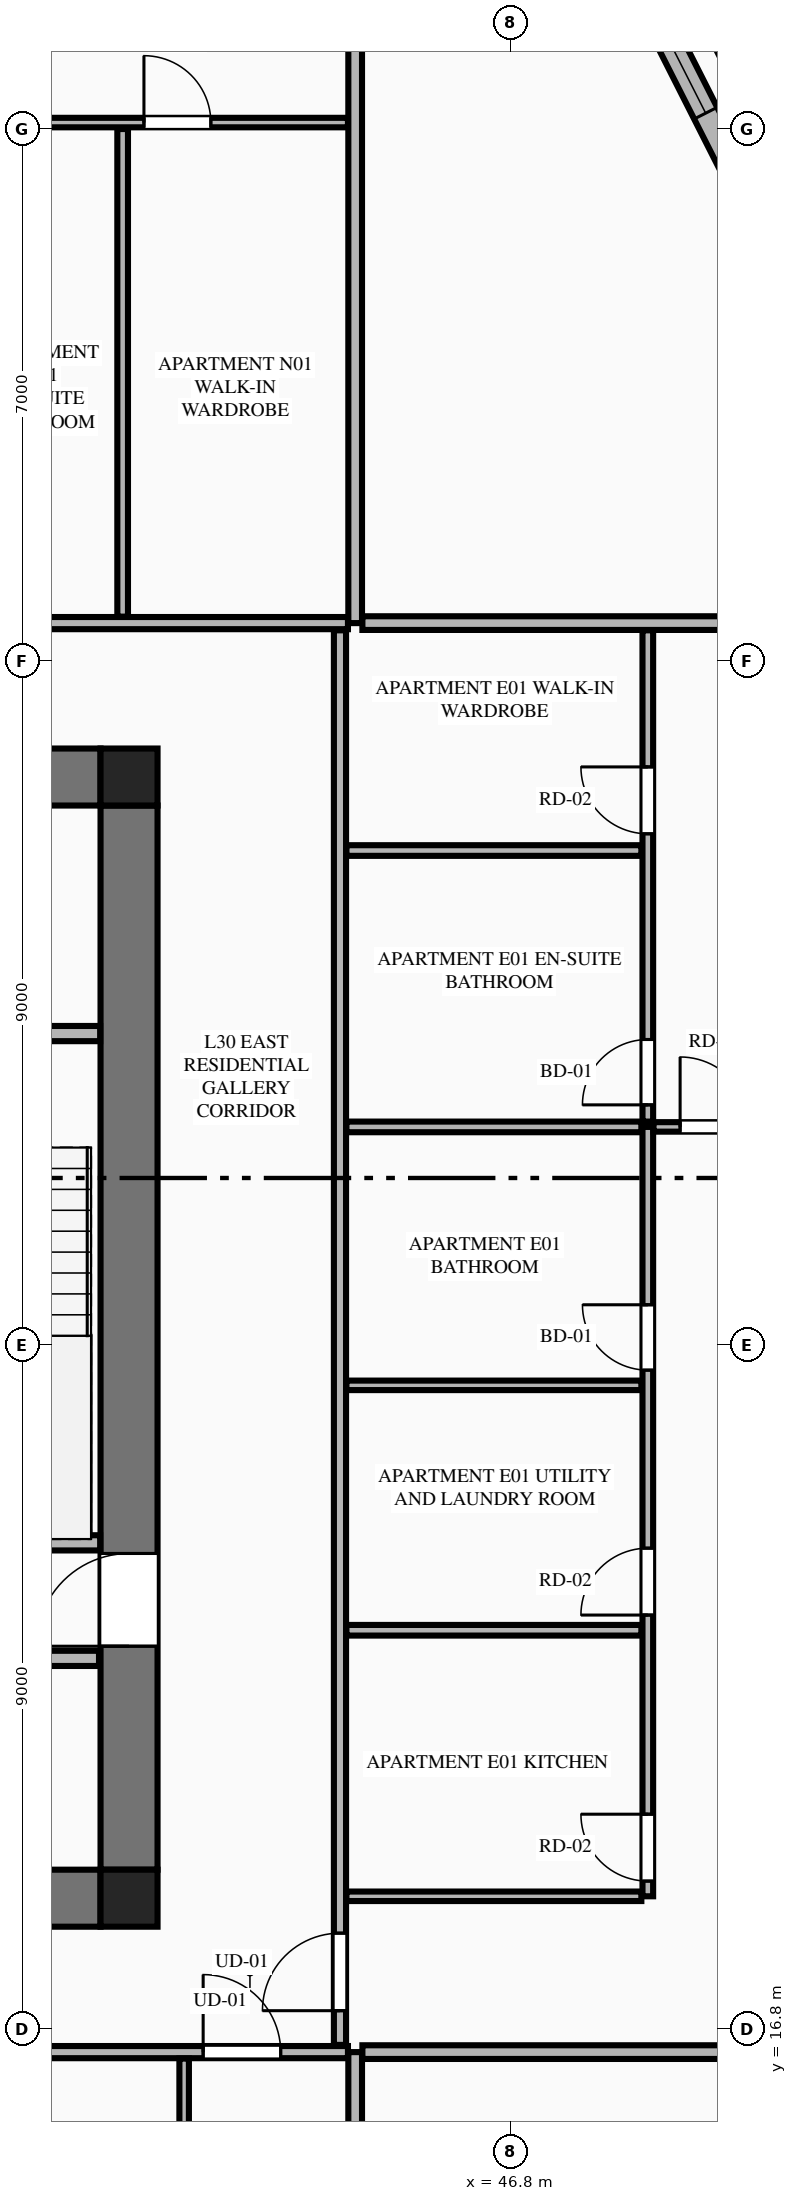
"""IFC4 building model, lengths in metres.
Left out: names, types, materials, properties, quantities, classifications, styles, units other than length and angle.
Written with IfcOpenShell. Run it as: python <this file> out.ifc"""

import sys

from ifc_helpers import new_model, si_unit, direction, frame, frame_2d, origin, origin_2d, place, context, subcontext, project, spatial, rectangle, extrude, element, fill, save


model = new_model("IFC4")
c1 = context("Model", 3, precision=1e-05, world=origin(), true_north=direction((0.0, 1.0)))
c2 = subcontext(c1, "Body", "Model", "MODEL_VIEW")
j1 = project(units=[si_unit("LENGTHUNIT", "METRE"), si_unit("PLANEANGLEUNIT", "RADIAN")], contexts=[c1])
p1 = place(None, origin())
s1 = spatial("IfcSite", under=j1, at=p1, CompositionType="ELEMENT")
p2 = place(p1, origin())
s2 = spatial("IfcBuilding", under=s1, at=p2, CompositionType="ELEMENT")
p3 = place(p2, frame((0.0, 0.0, 116.15)))
s3 = spatial("IfcBuildingStorey", under=s2, at=p3, CompositionType="ELEMENT", Elevation=116.15)
for number, where, z_axis, x_axis in (
    (1, (41.775, 18.525, 0.0), (0.0, 0.0, 1.0), (1.0, 0.0, 0.0)),
    (2, (41.775, 33.275, 0.0), (0.0, 0.0, 1.0), (1.0, 0.0, 0.0)),
):
    element("IfcColumn", number, at=place(p3, frame(where, z_axis=z_axis, x_axis=x_axis)), inside=s3, PredefinedType="COLUMN", context=c2, shape_type="SweptSolid", body=[
        extrude(rectangle(XDim=0.75, YDim=0.75, at=origin_2d()), origin(), (0.0, 0.0, 1.0), 3.55),
    ])
for number, where, z_axis, x_axis in (
    (3, (23.4, 18.525, 0.0), (0.0, 0.0, 1.0), (1.0, 0.0, 0.0)),
    (4, (23.4, 33.275, 0.0), (0.0, 0.0, 1.0), (1.0, 0.0, 0.0)),
):
    element("IfcWall", number, at=place(p3, frame(where, z_axis=z_axis, x_axis=x_axis)), inside=s3, PredefinedType="SHEAR", context=c2, shape_type="SweptSolid", body=[
        extrude(rectangle(XDim=18.0, YDim=0.75, at=frame_2d((9.0, 0.0))), origin(), (0.0, 0.0, 1.0), 3.34),
    ])
p4 = place(p3, frame((41.775, 18.9, 0.0), z_axis=(0.0, 0.0, 1.0), x_axis=(0.0, 1.0, 0.0)))
e5 = element("IfcWall", 5, at=p4, inside=s3, PredefinedType="SHEAR", context=c2, shape_type="SweptSolid", body=[
    extrude(rectangle(XDim=14.0, YDim=0.75, at=frame_2d((7.0, 0.0))), origin(), (0.0, 0.0, 1.0), 3.34),
])
p5 = place(p4, frame((2.94, 0.0, 0.0)))
e6 = element("IfcOpeningElement", 6, at=p5, cuts=e5, PredefinedType="OPENING", context=c2, shape_type="SweptSolid", body=[
    extrude(rectangle(XDim=1.22, YDim=2.25, at=frame_2d((0.61, 1.125))), frame((0.0, 0.385, 0.0), z_axis=(0.0, -1.0, 0.0), x_axis=(1.0, 0.0, 0.0)), (0.0, 0.0, 1.0), 0.77),
])
p6 = place(p3, frame((38.125, 23.2, 0.0), z_axis=(0.0, 0.0, 1.0), x_axis=(1.0, 0.0, 0.0)))
e7 = element("IfcWall", 7, at=p6, inside=s3, PredefinedType="PLUMBINGWALL", context=c2, shape_type="SweptSolid", body=[
    extrude(rectangle(XDim=3.27, YDim=0.2, at=frame_2d((1.635, 0.0))), origin(), (0.0, 0.0, 1.0), 3.34),
])
p7 = place(p3, frame((38.125, 29.9, 0.0), z_axis=(0.0, 0.0, 1.0), x_axis=(1.0, 0.0, 0.0)))
e8 = element("IfcWall", 8, at=p7, inside=s3, PredefinedType="PLUMBINGWALL", context=c2, shape_type="SweptSolid", body=[
    extrude(rectangle(XDim=3.27, YDim=0.2, at=frame_2d((1.635, 0.0))), origin(), (0.0, 0.0, 1.0), 3.34),
])
p8 = place(p7, frame((0.5, 0.0, 0.0)))
e9 = element("IfcOpeningElement", 9, at=p8, cuts=e8, PredefinedType="OPENING", context=c2, shape_type="SweptSolid", body=[
    extrude(rectangle(XDim=0.85, YDim=2.05, at=frame_2d((0.425, 1.025))), frame((0.0, 0.11, 0.0), z_axis=(0.0, -1.0, 0.0), x_axis=(1.0, 0.0, 0.0)), (0.0, 0.0, 1.0), 0.22),
])
p9 = place(p3, frame((23.42, 21.68, 0.0), z_axis=(0.0, 0.0, 1.0), x_axis=(1.0, 0.0, 0.0)))
e10 = element("IfcWall", 10, at=p9, inside=s3, PredefinedType="PLUMBINGWALL", context=c2, shape_type="SweptSolid", body=[
    extrude(rectangle(XDim=17.96, YDim=0.2, at=frame_2d((8.98, 0.0))), origin(), (0.0, 0.0, 1.0), 3.34),
])
p10 = place(p9, frame((11.6, 0.0, 0.0)))
e11 = element("IfcOpeningElement", 11, at=p10, cuts=e10, PredefinedType="OPENING", context=c2, shape_type="SweptSolid", body=[
    extrude(rectangle(XDim=1.1, YDim=2.2, at=frame_2d((0.55, 1.1))), frame((0.0, 0.11, 0.0), z_axis=(0.0, -1.0, 0.0), x_axis=(1.0, 0.0, 0.0)), (0.0, 0.0, 1.0), 0.22),
])
p11 = place(p9, frame((0.41, 0.0, 0.0)))
e12 = element("IfcOpeningElement", 12, at=p11, cuts=e10, PredefinedType="OPENING", context=c2, shape_type="SweptSolid", body=[
    extrude(rectangle(XDim=0.85, YDim=2.05, at=frame_2d((0.425, 1.025))), frame((0.0, 0.11, 0.0), z_axis=(0.0, -1.0, 0.0), x_axis=(1.0, 0.0, 0.0)), (0.0, 0.0, 1.0), 0.22),
])
p12 = place(p9, frame((6.03, 0.0, 0.0)))
e13 = element("IfcOpeningElement", 13, at=p12, cuts=e10, PredefinedType="OPENING", context=c2, shape_type="SweptSolid", body=[
    extrude(rectangle(XDim=0.85, YDim=2.05, at=frame_2d((0.425, 1.025))), frame((0.0, 0.11, 0.0), z_axis=(0.0, -1.0, 0.0), x_axis=(1.0, 0.0, 0.0)), (0.0, 0.0, 1.0), 0.22),
])
p13 = place(p9, frame((13.78, 0.0, 0.0)))
e14 = element("IfcOpeningElement", 14, at=p13, cuts=e10, PredefinedType="OPENING", context=c2, shape_type="SweptSolid", body=[
    extrude(rectangle(XDim=0.85, YDim=2.05, at=frame_2d((0.425, 1.025))), frame((0.0, 0.11, 0.0), z_axis=(0.0, -1.0, 0.0), x_axis=(1.0, 0.0, 0.0)), (0.0, 0.0, 1.0), 0.22),
])
p14 = place(p3, frame((50.251, 40.251, 0.0), z_axis=(0.0, 0.0, 1.0), x_axis=(-0.451548465867, 0.892246593142, 0.0)))
e15 = element("IfcWall", 15, at=p14, inside=s3, PredefinedType="STANDARD", context=c2, shape_type="SweptSolid", body=[
    extrude(rectangle(XDim=5.04, YDim=0.34, at=frame_2d((2.52, 0.0))), origin(), (0.0, 0.0, 1.0), 2.797),
])
p15 = place(p14, frame((1.97, 0.0, 0.75)))
e16 = element("IfcOpeningElement", 16, at=p15, cuts=e15, PredefinedType="OPENING", context=c2, shape_type="SweptSolid", body=[
    extrude(rectangle(XDim=1.1, YDim=1.897, at=frame_2d((0.55, 0.948))), frame((0.0, 0.18, 0.0), z_axis=(0.0, -1.0, 0.0), x_axis=(1.0, 0.0, 0.0)), (0.0, 0.0, 1.0), 0.36),
])
p16 = place(p3, frame((44.75, 4.105, 0.0), z_axis=(0.0, 0.0, 1.0), x_axis=(0.0, 1.0, 0.0)))
e17 = element("IfcWall", 17, at=p16, inside=s3, PredefinedType="PARTITIONING", context=c2, shape_type="SweptSolid", body=[
    extrude(rectangle(XDim=12.395, YDim=0.18, at=frame_2d((6.198, 0.0))), origin(), (0.0, 0.0, 1.0), 3.34),
])
p17 = place(p3, frame((28.663, 16.5, 0.0), z_axis=(0.0, 0.0, 1.0), x_axis=(1.0, 0.0, 0.0)))
e18 = element("IfcWall", 18, at=p17, inside=s3, PredefinedType="PARTITIONING", context=c2, shape_type="SweptSolid", body=[
    extrude(rectangle(XDim=15.992, YDim=0.16, at=frame_2d((7.996, 0.0))), origin(), (0.0, 0.0, 1.0), 3.34),
])
p18 = place(p17, frame((14.087, 0.0, 0.0)))
e19 = element("IfcOpeningElement", 19, at=p18, cuts=e18, PredefinedType="OPENING", context=c2, shape_type="SweptSolid", body=[
    extrude(rectangle(XDim=1.02, YDim=2.25, at=frame_2d((0.51, 1.125))), frame((0.0, 0.09, 0.0), z_axis=(0.0, -1.0, 0.0), x_axis=(1.0, 0.0, 0.0)), (0.0, 0.0, 1.0), 0.18),
])
p19 = place(p3, frame((42.5, 12.391, 0.0), z_axis=(0.0, 0.0, 1.0), x_axis=(0.0, 1.0, 0.0)))
e20 = element("IfcWall", 20, at=p19, inside=s3, PredefinedType="PARTITIONING", context=c2, shape_type="SweptSolid", body=[
    extrude(rectangle(XDim=4.024, YDim=0.125, at=frame_2d((2.012, 0.0))), origin(), (0.0, 0.0, 1.0), 2.722),
])
p20 = place(p3, frame((44.75, 35.3, 0.0), z_axis=(0.0, 0.0, 1.0), x_axis=(0.0, 1.0, 0.0)))
e21 = element("IfcWall", 21, at=p20, inside=s3, PredefinedType="PARTITIONING", context=c2, shape_type="SweptSolid", body=[
    extrude(rectangle(XDim=12.195, YDim=0.18, at=frame_2d((6.098, 0.0))), origin(), (0.0, 0.0, 1.0), 3.34),
])
p21 = place(p3, frame((20.145, 35.3, 0.0), z_axis=(0.0, 0.0, 1.0), x_axis=(1.0, 0.0, 0.0)))
e22 = element("IfcWall", 22, at=p21, inside=s3, PredefinedType="PARTITIONING", context=c2, shape_type="SweptSolid", body=[
    extrude(rectangle(XDim=24.51, YDim=0.16, at=frame_2d((12.255, 0.0))), origin(), (0.0, 0.0, 1.0), 3.34),
])
p22 = place(p21, frame((0.405, 0.0, 0.0)))
e23 = element("IfcOpeningElement", 23, at=p22, cuts=e22, PredefinedType="OPENING", context=c2, shape_type="SweptSolid", body=[
    extrude(rectangle(XDim=1.35, YDim=2.35, at=frame_2d((0.675, 1.175))), frame((0.0, 0.09, 0.0), z_axis=(0.0, -1.0, 0.0), x_axis=(1.0, 0.0, 0.0)), (0.0, 0.0, 1.0), 0.18),
])
p23 = place(p3, frame((34.643, 41.885, 0.0), z_axis=(0.0, 0.0, 1.0), x_axis=(1.0, 0.0, 0.0)))
e24 = element("IfcWall", 24, at=p23, inside=s3, PredefinedType="PARTITIONING", context=c2, shape_type="SweptSolid", body=[
    extrude(rectangle(XDim=10.012, YDim=0.125, at=frame_2d((5.006, 0.0))), origin(), (0.0, 0.0, 1.0), 3.34),
])
p24 = place(p23, frame((5.18, 0.0, 0.0)))
e25 = element("IfcOpeningElement", 25, at=p24, cuts=e24, PredefinedType="OPENING", context=c2, shape_type="SweptSolid", body=[
    extrude(rectangle(XDim=0.86, YDim=2.1, at=frame_2d((0.43, 1.05))), frame((0.0, 0.073, 0.0), z_axis=(0.0, -1.0, 0.0), x_axis=(1.0, 0.0, 0.0)), (0.0, 0.0, 1.0), 0.145),
])
p25 = place(p23, frame((7.328, 0.0, 0.0)))
e26 = element("IfcOpeningElement", 26, at=p25, cuts=e24, PredefinedType="OPENING", context=c2, shape_type="SweptSolid", body=[
    extrude(rectangle(XDim=0.88, YDim=2.15, at=frame_2d((0.44, 1.075))), frame((0.0, 0.073, 0.0), z_axis=(0.0, -1.0, 0.0), x_axis=(1.0, 0.0, 0.0)), (0.0, 0.0, 1.0), 0.145),
])
p26 = place(p23, frame((0.3, 0.0, 0.0)))
e27 = element("IfcOpeningElement", 27, at=p26, cuts=e24, PredefinedType="OPENING", context=c2, shape_type="SweptSolid", body=[
    extrude(rectangle(XDim=0.88, YDim=2.15, at=frame_2d((0.44, 1.075))), frame((0.0, 0.073, 0.0), z_axis=(0.0, -1.0, 0.0), x_axis=(1.0, 0.0, 0.0)), (0.0, 0.0, 1.0), 0.145),
])
p27 = place(p3, frame((41.691, 35.385, 0.0), z_axis=(0.0, 0.0, 1.0), x_axis=(0.0, 1.0, 0.0)))
e28 = element("IfcWall", 28, at=p27, inside=s3, PredefinedType="PLUMBINGWALL", context=c2, shape_type="SweptSolid", body=[
    extrude(rectangle(XDim=6.415, YDim=0.14, at=frame_2d((3.208, 0.0))), origin(), (0.0, 0.0, 1.0), 2.722),
])
p28 = place(p3, frame((44.845, 16.5, 0.0), z_axis=(0.0, 0.0, 1.0), x_axis=(1.0, 0.0, 0.0)))
e29 = element("IfcWall", 29, at=p28, inside=s3, PredefinedType="PARTITIONING", context=c2, shape_type="SweptSolid", body=[
    extrude(rectangle(XDim=7.77, YDim=0.18, at=frame_2d((3.885, 0.0))), origin(), (0.0, 0.0, 1.0), 3.34),
])
p29 = place(p3, frame((44.845, 35.3, 0.0), z_axis=(0.0, 0.0, 1.0), x_axis=(1.0, 0.0, 0.0)))
e30 = element("IfcWall", 30, at=p29, inside=s3, PredefinedType="PARTITIONING", context=c2, shape_type="SweptSolid", body=[
    extrude(rectangle(XDim=7.669, YDim=0.18, at=frame_2d((3.834, 0.0))), origin(), (0.0, 0.0, 1.0), 3.34),
])
p30 = place(p3, frame((44.55, 16.595, 0.0), z_axis=(0.0, 0.0, 1.0), x_axis=(0.0, 1.0, 0.0)))
e31 = element("IfcWall", 31, at=p30, inside=s3, PredefinedType="PARTITIONING", context=c2, shape_type="SweptSolid", body=[
    extrude(rectangle(XDim=18.61, YDim=0.16, at=frame_2d((9.305, 0.0))), origin(), (0.0, 0.0, 1.0), 3.34),
])
p31 = place(p30, frame((0.45, 0.0, 0.0)))
e32 = element("IfcOpeningElement", 32, at=p31, cuts=e31, PredefinedType="OPENING", context=c2, shape_type="SweptSolid", body=[
    extrude(rectangle(XDim=1.02, YDim=2.25, at=frame_2d((0.51, 1.125))), frame((0.0, 0.09, 0.0), z_axis=(0.0, -1.0, 0.0), x_axis=(1.0, 0.0, 0.0)), (0.0, 0.0, 1.0), 0.18),
])
p32 = place(p3, frame((44.635, 18.55, 0.0), z_axis=(0.0, 0.0, 1.0), x_axis=(1.0, 0.0, 0.0)))
e33 = element("IfcWall", 33, at=p32, inside=s3, PredefinedType="PARTITIONING", context=c2, shape_type="SweptSolid", body=[
    extrude(rectangle(XDim=3.88, YDim=0.125, at=frame_2d((1.94, 0.0))), origin(), (0.0, 0.0, 1.0), 2.722),
])
p33 = place(p3, frame((48.6, 18.55, 0.0), z_axis=(0.0, 0.0, 1.0), x_axis=(0.0, 1.0, 0.0)))
e34 = element("IfcWall", 34, at=p33, inside=s3, PredefinedType="PLUMBINGWALL", context=c2, shape_type="SweptSolid", body=[
    extrude(rectangle(XDim=10.122, YDim=0.14, at=frame_2d((5.061, 0.0))), origin(), (0.0, 0.0, 1.0), 3.34),
])
p34 = place(p33, frame((0.2, 0.0, 0.0)))
e35 = element("IfcOpeningElement", 35, at=p34, cuts=e34, PredefinedType="OPENING", context=c2, shape_type="SweptSolid", body=[
    extrude(rectangle(XDim=0.88, YDim=2.15, at=frame_2d((0.44, 1.075))), frame((0.0, 0.08, 0.0), z_axis=(0.0, -1.0, 0.0), x_axis=(1.0, 0.0, 0.0)), (0.0, 0.0, 1.0), 0.16),
])
p35 = place(p33, frame((3.7, 0.0, 0.0)))
e36 = element("IfcOpeningElement", 36, at=p35, cuts=e34, PredefinedType="OPENING", context=c2, shape_type="SweptSolid", body=[
    extrude(rectangle(XDim=0.88, YDim=2.15, at=frame_2d((0.44, 1.075))), frame((0.0, 0.08, 0.0), z_axis=(0.0, -1.0, 0.0), x_axis=(1.0, 0.0, 0.0)), (0.0, 0.0, 1.0), 0.16),
])
p36 = place(p33, frame((6.922, 0.0, 0.0)))
e37 = element("IfcOpeningElement", 37, at=p36, cuts=e34, PredefinedType="OPENING", context=c2, shape_type="SweptSolid", body=[
    extrude(rectangle(XDim=0.86, YDim=2.1, at=frame_2d((0.43, 1.05))), frame((0.0, 0.08, 0.0), z_axis=(0.0, -1.0, 0.0), x_axis=(1.0, 0.0, 0.0)), (0.0, 0.0, 1.0), 0.16),
])
p37 = place(p3, frame((48.6, 28.742, 0.0), z_axis=(0.0, 0.0, 1.0), x_axis=(0.0, 1.0, 0.0)))
e38 = element("IfcWall", 38, at=p37, inside=s3, PredefinedType="PLUMBINGWALL", context=c2, shape_type="SweptSolid", body=[
    extrude(rectangle(XDim=6.463, YDim=0.14, at=frame_2d((3.231, 0.0))), origin(), (0.0, 0.0, 1.0), 3.34),
])
p38 = place(p37, frame((0.22, 0.0, 0.0)))
e39 = element("IfcOpeningElement", 39, at=p38, cuts=e38, PredefinedType="OPENING", context=c2, shape_type="SweptSolid", body=[
    extrude(rectangle(XDim=0.86, YDim=2.1, at=frame_2d((0.43, 1.05))), frame((0.0, 0.08, 0.0), z_axis=(0.0, -1.0, 0.0), x_axis=(1.0, 0.0, 0.0)), (0.0, 0.0, 1.0), 0.16),
])
p39 = place(p37, frame((3.786, 0.0, 0.0)))
e40 = element("IfcOpeningElement", 40, at=p39, cuts=e38, PredefinedType="OPENING", context=c2, shape_type="SweptSolid", body=[
    extrude(rectangle(XDim=0.88, YDim=2.15, at=frame_2d((0.44, 1.075))), frame((0.0, 0.08, 0.0), z_axis=(0.0, -1.0, 0.0), x_axis=(1.0, 0.0, 0.0)), (0.0, 0.0, 1.0), 0.16),
])
p40 = place(p3, frame((44.635, 28.672, 0.0), z_axis=(0.0, 0.0, 1.0), x_axis=(1.0, 0.0, 0.0)))
e41 = element("IfcWall", 41, at=p40, inside=s3, PredefinedType="PLUMBINGWALL", context=c2, shape_type="SweptSolid", body=[
    extrude(rectangle(XDim=3.88, YDim=0.14, at=frame_2d((1.94, 0.0))), origin(), (0.0, 0.0, 1.0), 3.34),
])
p41 = place(p3, frame((48.675, 28.672, 0.0), z_axis=(0.0, 0.0, 1.0), x_axis=(1.0, 0.0, 0.0)))
e42 = element("IfcWall", 42, at=p41, inside=s3, PredefinedType="PARTITIONING", context=c2, shape_type="SweptSolid", body=[
    extrude(rectangle(XDim=7.208, YDim=0.125, at=frame_2d((3.604, 0.0))), origin(), (0.0, 0.0, 1.0), 3.34),
])
p42 = place(p41, frame((0.35, 0.0, 0.0)))
e43 = element("IfcOpeningElement", 43, at=p42, cuts=e42, PredefinedType="OPENING", context=c2, shape_type="SweptSolid", body=[
    extrude(rectangle(XDim=0.92, YDim=2.15, at=frame_2d((0.46, 1.075))), frame((0.0, 0.073, 0.0), z_axis=(0.0, -1.0, 0.0), x_axis=(1.0, 0.0, 0.0)), (0.0, 0.0, 1.0), 0.145),
])
p43 = place(p3, frame((44.635, 22.05, 0.0), z_axis=(0.0, 0.0, 1.0), x_axis=(1.0, 0.0, 0.0)))
e44 = element("IfcWall", 44, at=p43, inside=s3, PredefinedType="PLUMBINGWALL", context=c2, shape_type="SweptSolid", body=[
    extrude(rectangle(XDim=3.88, YDim=0.14, at=frame_2d((1.94, 0.0))), origin(), (0.0, 0.0, 1.0), 3.34),
])
p44 = place(p3, frame((44.635, 25.272, 0.0), z_axis=(0.0, 0.0, 1.0), x_axis=(1.0, 0.0, 0.0)))
e45 = element("IfcWall", 45, at=p44, inside=s3, PredefinedType="PARTITIONING", context=c2, shape_type="SweptSolid", body=[
    extrude(rectangle(XDim=3.88, YDim=0.125, at=frame_2d((1.94, 0.0))), origin(), (0.0, 0.0, 1.0), 3.34),
])
p45 = place(p3, frame((44.635, 32.308, 0.0), z_axis=(0.0, 0.0, 1.0), x_axis=(1.0, 0.0, 0.0)))
e46 = element("IfcWall", 46, at=p45, inside=s3, PredefinedType="PLUMBINGWALL", context=c2, shape_type="SweptSolid", body=[
    extrude(rectangle(XDim=3.88, YDim=0.14, at=frame_2d((1.94, 0.0))), origin(), (0.0, 0.0, 1.0), 3.34),
])
p46 = place(p5, origin())
e47 = element("IfcDoor", 47, at=p46, inside=s3, OperationType="SINGLE_SWING_LEFT", PredefinedType="DOOR", context=c2, shape_type="SweptSolid", body=[
    extrude(rectangle(XDim=1.22, YDim=2.25, at=frame_2d((0.61, 1.125))), frame((0.0, 0.025, 0.0), z_axis=(0.0, -1.0, 0.0), x_axis=(1.0, 0.0, 0.0)), (0.0, 0.0, 1.0), 0.05),
])
fill(e6, e47)
p47 = place(p15, origin())
e48 = element("IfcWindow", 48, at=p47, inside=s3, PartitioningType="SINGLE_PANEL", PredefinedType="WINDOW", context=c2, shape_type="SweptSolid", body=[
    extrude(rectangle(XDim=1.1, YDim=1.897, at=frame_2d((0.55, 0.948))), frame((0.0, 0.03, 0.0), z_axis=(0.0, -1.0, 0.0), x_axis=(1.0, 0.0, 0.0)), (0.0, 0.0, 1.0), 0.06),
])
fill(e16, e48)
p48 = place(p18, origin())
e49 = element("IfcDoor", 49, at=p48, inside=s3, OperationType="SINGLE_SWING_LEFT", PredefinedType="DOOR", context=c2, shape_type="SweptSolid", body=[
    extrude(rectangle(XDim=1.02, YDim=2.25, at=frame_2d((0.51, 1.125))), frame((0.0, 0.025, 0.0), z_axis=(0.0, -1.0, 0.0), x_axis=(1.0, 0.0, 0.0)), (0.0, 0.0, 1.0), 0.05),
])
fill(e19, e49)
p49 = place(p25, origin())
e50 = element("IfcDoor", 50, at=p49, inside=s3, OperationType="SINGLE_SWING_LEFT", PredefinedType="DOOR", context=c2, shape_type="SweptSolid", body=[
    extrude(rectangle(XDim=0.88, YDim=2.15, at=frame_2d((0.44, 1.075))), frame((0.0, 0.025, 0.0), z_axis=(0.0, -1.0, 0.0), x_axis=(1.0, 0.0, 0.0)), (0.0, 0.0, 1.0), 0.05),
])
fill(e26, e50)
p50 = place(p34, origin())
e51 = element("IfcDoor", 51, at=p50, inside=s3, OperationType="SINGLE_SWING_RIGHT", PredefinedType="DOOR", context=c2, shape_type="SweptSolid", body=[
    extrude(rectangle(XDim=0.88, YDim=2.15, at=frame_2d((0.44, 1.075))), frame((0.0, 0.025, 0.0), z_axis=(0.0, -1.0, 0.0), x_axis=(1.0, 0.0, 0.0)), (0.0, 0.0, 1.0), 0.05),
])
fill(e35, e51)
p51 = place(p35, origin())
e52 = element("IfcDoor", 52, at=p51, inside=s3, OperationType="SINGLE_SWING_LEFT", PredefinedType="DOOR", context=c2, shape_type="SweptSolid", body=[
    extrude(rectangle(XDim=0.88, YDim=2.15, at=frame_2d((0.44, 1.075))), frame((0.0, 0.025, 0.0), z_axis=(0.0, -1.0, 0.0), x_axis=(1.0, 0.0, 0.0)), (0.0, 0.0, 1.0), 0.05),
])
fill(e36, e52)
p52 = place(p36, origin())
e53 = element("IfcDoor", 53, at=p52, inside=s3, OperationType="SINGLE_SWING_RIGHT", PredefinedType="DOOR", context=c2, shape_type="SweptSolid", body=[
    extrude(rectangle(XDim=0.86, YDim=2.1, at=frame_2d((0.43, 1.05))), frame((0.0, 0.025, 0.0), z_axis=(0.0, -1.0, 0.0), x_axis=(1.0, 0.0, 0.0)), (0.0, 0.0, 1.0), 0.05),
])
fill(e37, e53)
p53 = place(p38, origin())
e54 = element("IfcDoor", 54, at=p53, inside=s3, OperationType="SINGLE_SWING_LEFT", PredefinedType="DOOR", context=c2, shape_type="SweptSolid", body=[
    extrude(rectangle(XDim=0.86, YDim=2.1, at=frame_2d((0.43, 1.05))), frame((0.0, 0.025, 0.0), z_axis=(0.0, -1.0, 0.0), x_axis=(1.0, 0.0, 0.0)), (0.0, 0.0, 1.0), 0.05),
])
fill(e39, e54)
p54 = place(p39, origin())
e55 = element("IfcDoor", 55, at=p54, inside=s3, OperationType="SINGLE_SWING_RIGHT", PredefinedType="DOOR", context=c2, shape_type="SweptSolid", body=[
    extrude(rectangle(XDim=0.88, YDim=2.15, at=frame_2d((0.44, 1.075))), frame((0.0, 0.025, 0.0), z_axis=(0.0, -1.0, 0.0), x_axis=(1.0, 0.0, 0.0)), (0.0, 0.0, 1.0), 0.05),
])
fill(e40, e55)
p55 = place(p31, origin())
e56 = element("IfcDoor", 56, at=p55, inside=s3, OperationType="SINGLE_SWING_LEFT", PredefinedType="DOOR", context=c2, shape_type="SweptSolid", body=[
    extrude(rectangle(XDim=1.02, YDim=2.25, at=frame_2d((0.51, 1.125))), frame((0.0, 0.025, 0.0), z_axis=(0.0, -1.0, 0.0), x_axis=(1.0, 0.0, 0.0)), (0.0, 0.0, 1.0), 0.05),
])
fill(e32, e56)
p56 = place(p42, origin())
e57 = element("IfcDoor", 57, at=p56, inside=s3, OperationType="SINGLE_SWING_LEFT", PredefinedType="DOOR", context=c2, shape_type="SweptSolid", body=[
    extrude(rectangle(XDim=0.92, YDim=2.15, at=frame_2d((0.46, 1.075))), frame((0.0, 0.025, 0.0), z_axis=(0.0, -1.0, 0.0), x_axis=(1.0, 0.0, 0.0)), (0.0, 0.0, 1.0), 0.05),
])
fill(e43, e57)
save(model, sys.argv[1])
